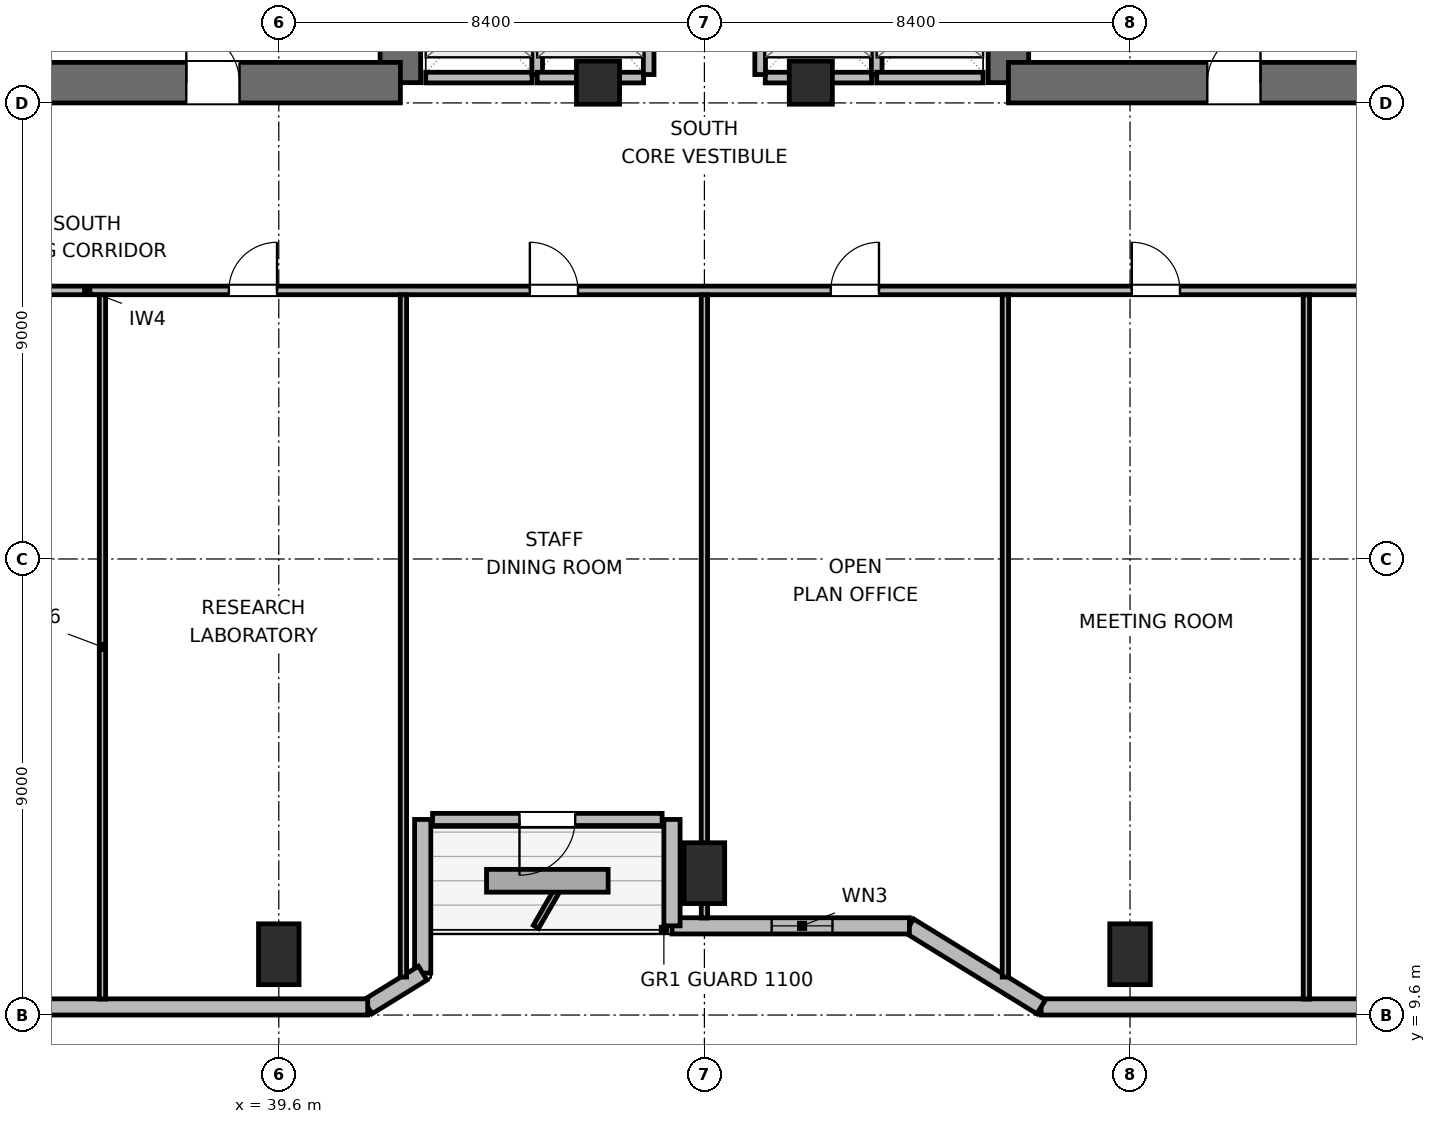
"""IFC4 building model, lengths in metres.
Left out: names, types, materials, properties, quantities, classifications, styles, units other than length and angle.
Written with IfcOpenShell. Run it as: python <this file> out.ifc"""

import sys

from ifc_helpers import new_model, si_unit, direction, frame, frame_2d, origin, origin_2d, place, context, subcontext, project, spatial, rectangle, extrude, element, fill, save


model = new_model("IFC4")
c1 = context("Model", 3, precision=1e-05, world=origin(), true_north=direction((0.0, 1.0)))
c2 = subcontext(c1, "Body", "Model", "MODEL_VIEW")
j1 = project(units=[si_unit("LENGTHUNIT", "METRE"), si_unit("PLANEANGLEUNIT", "RADIAN")], contexts=[c1])
p1 = place(None, origin())
s1 = spatial("IfcSite", under=j1, at=p1, CompositionType="ELEMENT")
p2 = place(p1, origin())
s2 = spatial("IfcBuilding", under=s1, at=p2, CompositionType="ELEMENT")
p3 = place(p2, frame((0.0, 0.0, 101.4)))
s3 = spatial("IfcBuildingStorey", under=s2, at=p3, CompositionType="ELEMENT", Elevation=101.4)
p4 = place(p3, frame((42.0, 28.0, 0.0), z_axis=(0.0, 0.0, 1.0), x_axis=(0.0, 1.0, 0.0)))
e1 = element("IfcWall", 1, at=p4, inside=s3, PredefinedType="SHEAR", context=c2, shape_type="SweptSolid", body=[
    extrude(rectangle(XDim=6.4, YDim=0.8, at=frame_2d((3.2, 0.0))), origin(), (0.0, 0.0, 1.0), 3.9),
])
p5 = place(p3, frame((32.8, 28.0, 0.0), z_axis=(0.0, 0.0, 1.0), x_axis=(1.0, 0.0, 0.0)))
e2 = element("IfcWall", 2, at=p5, inside=s3, PredefinedType="SHEAR", context=c2, shape_type="SweptSolid", body=[
    extrude(rectangle(XDim=9.2, YDim=0.8, at=frame_2d((4.6, 0.0))), origin(), (0.0, 0.0, 1.0), 3.9),
])
p6 = place(p5, frame((4.975, 0.0, 0.0)))
e3 = element("IfcOpeningElement", 3, at=p6, cuts=e2, PredefinedType="OPENING", context=c2, shape_type="SweptSolid", body=[
    extrude(rectangle(XDim=1.05, YDim=2.04, at=frame_2d((0.525, 1.02))), frame((0.0, 0.41, 0.0), z_axis=(0.0, -1.0, 0.0), x_axis=(1.0, 0.0, 0.0)), (0.0, 0.0, 1.0), 0.82),
])
p7 = place(p3, frame((54.0, 28.0, 0.0), z_axis=(0.0, 0.0, 1.0), x_axis=(0.0, 1.0, 0.0)))
e4 = element("IfcWall", 4, at=p7, inside=s3, PredefinedType="SHEAR", context=c2, shape_type="SweptSolid", body=[
    extrude(rectangle(XDim=7.8, YDim=0.8, at=frame_2d((3.9, 0.0))), origin(), (0.0, 0.0, 1.0), 3.9),
])
p8 = place(p3, frame((54.0, 28.0, 0.0), z_axis=(0.0, 0.0, 1.0), x_axis=(1.0, 0.0, 0.0)))
e5 = element("IfcWall", 5, at=p8, inside=s3, PredefinedType="SHEAR", context=c2, shape_type="SweptSolid", body=[
    extrude(rectangle(XDim=9.2, YDim=0.8, at=frame_2d((4.6, 0.0))), origin(), (0.0, 0.0, 1.0), 3.9),
])
p9 = place(p8, frame((3.925, 0.0, 0.0)))
e6 = element("IfcOpeningElement", 6, at=p9, cuts=e5, PredefinedType="OPENING", context=c2, shape_type="SweptSolid", body=[
    extrude(rectangle(XDim=1.05, YDim=2.04, at=frame_2d((0.525, 1.02))), frame((0.0, 0.41, 0.0), z_axis=(0.0, -1.0, 0.0), x_axis=(1.0, 0.0, 0.0)), (0.0, 0.0, 1.0), 0.82),
])
for number, where, z_axis, x_axis in (
    (7, (39.6, 10.8, 0.0), (0.0, 0.0, 1.0), (1.0, 0.0, 0.0)),
    (8, (48.0, 12.4, 0.0), (0.0, 0.0, 1.0), (1.0, 0.0, 0.0)),
    (9, (56.4, 10.8, 0.0), (0.0, 0.0, 1.0), (1.0, 0.0, 0.0)),
):
    element("IfcColumn", number, at=place(p3, frame(where, z_axis=z_axis, x_axis=x_axis)), inside=s3, PredefinedType="COLUMN", context=c2, shape_type="SweptSolid", body=[
        extrude(rectangle(XDim=0.8, YDim=1.2, at=origin_2d()), origin(), (0.0, 0.0, 1.0), 3.9),
    ])
for number, where, z_axis, x_axis in (
    (10, (45.9, 28.0, 0.0), (0.0, 0.0, 1.0), (1.0, 0.0, 0.0)),
    (11, (50.1, 28.0, 0.0), (0.0, 0.0, 1.0), (1.0, 0.0, 0.0)),
):
    element("IfcColumn", number, at=place(p3, frame(where, z_axis=z_axis, x_axis=x_axis)), inside=s3, PredefinedType="COLUMN", context=c2, shape_type="SweptSolid", body=[
        extrude(rectangle(XDim=0.85, YDim=0.85, at=origin_2d()), origin(), (0.0, 0.0, 1.0), 3.9),
    ])
p10 = place(p3, frame((65.379, 9.76, 0.0), z_axis=(0.0, 0.0, 1.0), x_axis=(-1.0, 0.0, 0.0)))
e12 = element("IfcWall", 12, at=p10, inside=s3, PredefinedType="SOLIDWALL", context=c2, shape_type="SweptSolid", body=[
    extrude(rectangle(XDim=10.734, YDim=0.32, at=frame_2d((5.367, 0.0))), origin(), (0.0, 0.0, 1.0), 3.64),
])
p11 = place(p10, frame((1.944, 0.0, 0.85)))
e13 = element("IfcOpeningElement", 13, at=p11, cuts=e12, PredefinedType="OPENING", context=c2, shape_type="SweptSolid", body=[
    extrude(rectangle(XDim=1.8, YDim=1.1, at=frame_2d((0.9, 0.55))), frame((0.0, 0.17, 0.0), z_axis=(0.0, -1.0, 0.0), x_axis=(1.0, 0.0, 0.0)), (0.0, 0.0, 1.0), 0.34),
])
p12 = place(p3, frame((54.645, 9.76, 0.0), z_axis=(0.0, 0.0, 1.0), x_axis=(-0.851630857047, 0.524142044989, 0.0)))
e14 = element("IfcWall", 14, at=p12, inside=s3, PredefinedType="SOLIDWALL", context=c2, shape_type="SweptSolid", body=[
    extrude(rectangle(XDim=3.053, YDim=0.32, at=frame_2d((1.526, 0.0))), origin(), (0.0, 0.0, 1.0), 2.875),
])
p13 = place(p3, frame((52.045, 11.36, 0.0), z_axis=(0.0, 0.0, 1.0), x_axis=(-1.0, 0.0, 0.0)))
e15 = element("IfcWall", 15, at=p13, inside=s3, PredefinedType="SOLIDWALL", context=c2, shape_type="SweptSolid", body=[
    extrude(rectangle(XDim=4.685, YDim=0.32, at=frame_2d((2.343, 0.0))), origin(), (0.0, 0.0, 1.0), 2.875),
])
p14 = place(p13, frame((1.518, 0.0, 0.85)))
e16 = element("IfcOpeningElement", 16, at=p14, cuts=e15, PredefinedType="OPENING", context=c2, shape_type="SweptSolid", body=[
    extrude(rectangle(XDim=1.2, YDim=1.1, at=frame_2d((0.6, 0.55))), frame((0.0, 0.17, 0.0), z_axis=(0.0, -1.0, 0.0), x_axis=(1.0, 0.0, 0.0)), (0.0, 0.0, 1.0), 0.34),
])
p15 = place(p3, frame((47.36, 11.36, 0.0), z_axis=(0.0, 0.0, 1.0), x_axis=(0.0, 1.0, 0.0)))
e17 = element("IfcWall", 17, at=p15, inside=s3, PredefinedType="SOLIDWALL", context=c2, shape_type="SweptSolid", body=[
    extrude(rectangle(XDim=2.1, YDim=0.32, at=frame_2d((1.05, 0.0))), origin(), (0.0, 0.0, 1.0), 2.875),
])
p16 = place(p3, frame((47.165, 13.46, 0.0), z_axis=(0.0, 0.0, 1.0), x_axis=(-1.0, 0.0, 0.0)))
e18 = element("IfcWall", 18, at=p16, inside=s3, PredefinedType="SOLIDWALL", context=c2, shape_type="SweptSolid", body=[
    extrude(rectangle(XDim=4.53, YDim=0.24, at=frame_2d((2.265, 0.0))), origin(), (0.0, 0.0, 1.0), 3.64),
])
p17 = place(p16, frame((1.715, 0.0, 0.0)))
e19 = element("IfcOpeningElement", 19, at=p17, cuts=e18, PredefinedType="OPENING", context=c2, shape_type="SweptSolid", body=[
    extrude(rectangle(XDim=1.1, YDim=2.04, at=frame_2d((0.55, 1.02))), frame((0.0, 0.13, 0.0), z_axis=(0.0, -1.0, 0.0), x_axis=(1.0, 0.0, 0.0)), (0.0, 0.0, 1.0), 0.26),
])
p18 = place(p3, frame((42.44, 13.46, 0.0), z_axis=(0.0, 0.0, 1.0), x_axis=(0.0, -1.0, 0.0)))
e20 = element("IfcWall", 20, at=p18, inside=s3, PredefinedType="SOLIDWALL", context=c2, shape_type="SweptSolid", body=[
    extrude(rectangle(XDim=3.032, YDim=0.32, at=frame_2d((1.516, 0.0))), origin(), (0.0, 0.0, 1.0), 2.875),
])
p19 = place(p3, frame((42.44, 10.427, 0.0), z_axis=(0.0, 0.0, 1.0), x_axis=(-0.851776724646, -0.523904964045, 0.0)))
e21 = element("IfcWall", 21, at=p19, inside=s3, PredefinedType="SOLIDWALL", context=c2, shape_type="SweptSolid", body=[
    extrude(rectangle(XDim=1.274, YDim=0.32, at=frame_2d((0.637, 0.0))), origin(), (0.0, 0.0, 1.0), 3.64),
])
p20 = place(p3, frame((41.355, 9.76, 0.0), z_axis=(0.0, 0.0, 1.0), x_axis=(-1.0, 0.0, 0.0)))
e22 = element("IfcWall", 22, at=p20, inside=s3, PredefinedType="SOLIDWALL", context=c2, shape_type="SweptSolid", body=[
    extrude(rectangle(XDim=17.934, YDim=0.32, at=frame_2d((8.967, 0.0))), origin(), (0.0, 0.0, 1.0), 3.64),
])
p21 = place(p3, frame((42.5, 28.1, 0.0), z_axis=(0.0, 0.0, 1.0), x_axis=(1.0, 0.0, 0.0)))
e23 = element("IfcWall", 23, at=p21, inside=s3, PredefinedType="PARTITIONING", context=c2, shape_type="SweptSolid", body=[
    extrude(rectangle(XDim=2.1, YDim=0.21, at=frame_2d((1.05, 0.0))), origin(), (0.0, 0.0, 1.0), 2.525),
])
p22 = place(p3, frame((44.7, 28.16, 0.0), z_axis=(0.0, 0.0, 1.0), x_axis=(0.0, 1.0, 0.0)))
e24 = element("IfcWall", 24, at=p22, inside=s3, PredefinedType="PARTITIONING", context=c2, shape_type="SweptSolid", body=[
    extrude(rectangle(XDim=2.28, YDim=0.21, at=frame_2d((1.14, 0.0))), origin(), (0.0, 0.0, 1.0), 3.64),
])
p23 = place(p3, frame((44.7, 28.1, 0.0), z_axis=(0.0, 0.0, 1.0), x_axis=(1.0, 0.0, 0.0)))
e25 = element("IfcWall", 25, at=p23, inside=s3, PredefinedType="PARTITIONING", context=c2, shape_type="SweptSolid", body=[
    extrude(rectangle(XDim=2.1, YDim=0.21, at=frame_2d((1.05, 0.0))), origin(), (0.0, 0.0, 1.0), 2.525),
])
p24 = place(p3, frame((46.9, 28.16, 0.0), z_axis=(0.0, 0.0, 1.0), x_axis=(0.0, 1.0, 0.0)))
e26 = element("IfcWall", 26, at=p24, inside=s3, PredefinedType="PARTITIONING", context=c2, shape_type="SweptSolid", body=[
    extrude(rectangle(XDim=2.28, YDim=0.21, at=frame_2d((1.14, 0.0))), origin(), (0.0, 0.0, 1.0), 3.64),
])
p25 = place(p3, frame((49.2, 28.1, 0.0), z_axis=(0.0, 0.0, 1.0), x_axis=(1.0, 0.0, 0.0)))
e27 = element("IfcWall", 27, at=p25, inside=s3, PredefinedType="PARTITIONING", context=c2, shape_type="SweptSolid", body=[
    extrude(rectangle(XDim=2.1, YDim=0.21, at=frame_2d((1.05, 0.0))), origin(), (0.0, 0.0, 1.0), 2.525),
])
for number, where, z_axis, x_axis in (
    (28, (49.1, 28.16, 0.0), (0.0, 0.0, 1.0), (0.0, 1.0, 0.0)),
    (29, (51.4, 28.16, 0.0), (0.0, 0.0, 1.0), (0.0, 1.0, 0.0)),
):
    element("IfcWall", number, at=place(p3, frame(where, z_axis=z_axis, x_axis=x_axis)), inside=s3, PredefinedType="PARTITIONING", context=c2, shape_type="SweptSolid", body=[
        extrude(rectangle(XDim=2.28, YDim=0.21, at=frame_2d((1.14, 0.0))), origin(), (0.0, 0.0, 1.0), 3.64),
    ])
p26 = place(p3, frame((51.4, 28.1, 0.0), z_axis=(0.0, 0.0, 1.0), x_axis=(1.0, 0.0, 0.0)))
e30 = element("IfcWall", 30, at=p26, inside=s3, PredefinedType="PARTITIONING", context=c2, shape_type="SweptSolid", body=[
    extrude(rectangle(XDim=2.1, YDim=0.21, at=frame_2d((1.05, 0.0))), origin(), (0.0, 0.0, 1.0), 2.525),
])
p27 = place(p3, frame((28.975, 23.9, 0.0), z_axis=(0.0, 0.0, 1.0), x_axis=(1.0, 0.0, 0.0)))
e31 = element("IfcWall", 31, at=p27, inside=s3, PredefinedType="PARTITIONING", context=c2, shape_type="SweptSolid", body=[
    extrude(rectangle(XDim=38.05, YDim=0.17, at=frame_2d((19.025, 0.0))), origin(), (0.0, 0.0, 1.0), 3.64),
])
p28 = place(p27, frame((3.097, 0.0, 0.0)))
e32 = element("IfcOpeningElement", 32, at=p28, cuts=e31, PredefinedType="OPENING", context=c2, shape_type="SweptSolid", body=[
    extrude(rectangle(XDim=0.95, YDim=2.04, at=frame_2d((0.475, 1.02))), frame((0.0, 0.095, 0.0), z_axis=(0.0, -1.0, 0.0), x_axis=(1.0, 0.0, 0.0)), (0.0, 0.0, 1.0), 0.19),
])
p29 = place(p27, frame((9.64, 0.0, 0.0)))
e33 = element("IfcOpeningElement", 33, at=p29, cuts=e31, PredefinedType="OPENING", context=c2, shape_type="SweptSolid", body=[
    extrude(rectangle(XDim=0.95, YDim=2.04, at=frame_2d((0.475, 1.02))), frame((0.0, 0.095, 0.0), z_axis=(0.0, -1.0, 0.0), x_axis=(1.0, 0.0, 0.0)), (0.0, 0.0, 1.0), 0.19),
])
p30 = place(p27, frame((15.58, 0.0, 0.0)))
e34 = element("IfcOpeningElement", 34, at=p30, cuts=e31, PredefinedType="OPENING", context=c2, shape_type="SweptSolid", body=[
    extrude(rectangle(XDim=0.95, YDim=2.04, at=frame_2d((0.475, 1.02))), frame((0.0, 0.095, 0.0), z_axis=(0.0, -1.0, 0.0), x_axis=(1.0, 0.0, 0.0)), (0.0, 0.0, 1.0), 0.19),
])
p31 = place(p27, frame((21.52, 0.0, 0.0)))
e35 = element("IfcOpeningElement", 35, at=p31, cuts=e31, PredefinedType="OPENING", context=c2, shape_type="SweptSolid", body=[
    extrude(rectangle(XDim=0.95, YDim=2.04, at=frame_2d((0.475, 1.02))), frame((0.0, 0.095, 0.0), z_axis=(0.0, -1.0, 0.0), x_axis=(1.0, 0.0, 0.0)), (0.0, 0.0, 1.0), 0.19),
])
p32 = place(p27, frame((27.46, 0.0, 0.0)))
e36 = element("IfcOpeningElement", 36, at=p32, cuts=e31, PredefinedType="OPENING", context=c2, shape_type="SweptSolid", body=[
    extrude(rectangle(XDim=0.95, YDim=2.04, at=frame_2d((0.475, 1.02))), frame((0.0, 0.095, 0.0), z_axis=(0.0, -1.0, 0.0), x_axis=(1.0, 0.0, 0.0)), (0.0, 0.0, 1.0), 0.19),
])
p33 = place(p27, frame((34.003, 0.0, 0.0)))
e37 = element("IfcOpeningElement", 37, at=p33, cuts=e31, PredefinedType="OPENING", context=c2, shape_type="SweptSolid", body=[
    extrude(rectangle(XDim=0.95, YDim=2.04, at=frame_2d((0.475, 1.02))), frame((0.0, 0.095, 0.0), z_axis=(0.0, -1.0, 0.0), x_axis=(1.0, 0.0, 0.0)), (0.0, 0.0, 1.0), 0.19),
])
p34 = place(p3, frame((36.12, 9.915, 0.0), z_axis=(0.0, 0.0, 1.0), x_axis=(0.0, 1.0, 0.0)))
e38 = element("IfcWall", 38, at=p34, inside=s3, PredefinedType="PARTITIONING", context=c2, shape_type="SweptSolid", body=[
    extrude(rectangle(XDim=13.898, YDim=0.125, at=frame_2d((6.949, 0.0))), origin(), (0.0, 0.0, 1.0), 3.64),
])
p35 = place(p3, frame((42.06, 10.349, 0.0), z_axis=(0.0, 0.0, 1.0), x_axis=(0.0, 1.0, 0.0)))
e39 = element("IfcWall", 39, at=p35, inside=s3, PredefinedType="PARTITIONING", context=c2, shape_type="SweptSolid", body=[
    extrude(rectangle(XDim=13.464, YDim=0.125, at=frame_2d((6.732, 0.0))), origin(), (0.0, 0.0, 1.0), 3.003),
])
p36 = place(p3, frame((48.0, 11.515, 0.0), z_axis=(0.0, 0.0, 1.0), x_axis=(0.0, 1.0, 0.0)))
e40 = element("IfcWall", 40, at=p36, inside=s3, PredefinedType="PARTITIONING", context=c2, shape_type="SweptSolid", body=[
    extrude(rectangle(XDim=12.298, YDim=0.125, at=frame_2d((6.149, 0.0))), origin(), (0.0, 0.0, 1.0), 3.003),
])
p37 = place(p3, frame((53.94, 10.349, 0.0), z_axis=(0.0, 0.0, 1.0), x_axis=(0.0, 1.0, 0.0)))
e41 = element("IfcWall", 41, at=p37, inside=s3, PredefinedType="PARTITIONING", context=c2, shape_type="SweptSolid", body=[
    extrude(rectangle(XDim=13.464, YDim=0.125, at=frame_2d((6.732, 0.0))), origin(), (0.0, 0.0, 1.0), 3.003),
])
p38 = place(p3, frame((59.88, 9.915, 0.0), z_axis=(0.0, 0.0, 1.0), x_axis=(0.0, 1.0, 0.0)))
e42 = element("IfcWall", 42, at=p38, inside=s3, PredefinedType="PARTITIONING", context=c2, shape_type="SweptSolid", body=[
    extrude(rectangle(XDim=13.898, YDim=0.125, at=frame_2d((6.949, 0.0))), origin(), (0.0, 0.0, 1.0), 3.64),
])
p39 = place(p14, origin())
e43 = element("IfcWindow", 43, at=p39, inside=s3, PartitioningType="SINGLE_PANEL", PredefinedType="WINDOW", context=c2, shape_type="SweptSolid", body=[
    extrude(rectangle(XDim=1.2, YDim=1.1, at=frame_2d((0.6, 0.55))), frame((0.0, 0.03, 0.0), z_axis=(0.0, -1.0, 0.0), x_axis=(1.0, 0.0, 0.0)), (0.0, 0.0, 1.0), 0.06),
])
fill(e16, e43)
p40 = place(p17, origin())
e44 = element("IfcDoor", 44, at=p40, inside=s3, OperationType="SINGLE_SWING_RIGHT", PredefinedType="DOOR", context=c2, shape_type="SweptSolid", body=[
    extrude(rectangle(XDim=1.1, YDim=2.04, at=frame_2d((0.55, 1.02))), frame((0.0, 0.025, 0.0), z_axis=(0.0, -1.0, 0.0), x_axis=(1.0, 0.0, 0.0)), (0.0, 0.0, 1.0), 0.05),
])
fill(e19, e44)
p41 = place(p6, origin())
e45 = element("IfcDoor", 45, at=p41, inside=s3, OperationType="SINGLE_SWING_LEFT", PredefinedType="DOOR", context=c2, shape_type="SweptSolid", body=[
    extrude(rectangle(XDim=1.05, YDim=2.04, at=frame_2d((0.525, 1.02))), frame((0.0, 0.025, 0.0), z_axis=(0.0, -1.0, 0.0), x_axis=(1.0, 0.0, 0.0)), (0.0, 0.0, 1.0), 0.05),
])
fill(e3, e45)
p42 = place(p9, origin())
e46 = element("IfcDoor", 46, at=p42, inside=s3, OperationType="SINGLE_SWING_RIGHT", PredefinedType="DOOR", context=c2, shape_type="SweptSolid", body=[
    extrude(rectangle(XDim=1.05, YDim=2.04, at=frame_2d((0.525, 1.02))), frame((0.0, 0.025, 0.0), z_axis=(0.0, -1.0, 0.0), x_axis=(1.0, 0.0, 0.0)), (0.0, 0.0, 1.0), 0.05),
])
fill(e6, e46)
p43 = place(p29, origin())
e47 = element("IfcDoor", 47, at=p43, inside=s3, OperationType="SINGLE_SWING_RIGHT", PredefinedType="DOOR", context=c2, shape_type="SweptSolid", body=[
    extrude(rectangle(XDim=0.95, YDim=2.04, at=frame_2d((0.475, 1.02))), frame((0.0, 0.025, 0.0), z_axis=(0.0, -1.0, 0.0), x_axis=(1.0, 0.0, 0.0)), (0.0, 0.0, 1.0), 0.05),
])
fill(e33, e47)
p44 = place(p30, origin())
e48 = element("IfcDoor", 48, at=p44, inside=s3, OperationType="SINGLE_SWING_LEFT", PredefinedType="DOOR", context=c2, shape_type="SweptSolid", body=[
    extrude(rectangle(XDim=0.95, YDim=2.04, at=frame_2d((0.475, 1.02))), frame((0.0, 0.025, 0.0), z_axis=(0.0, -1.0, 0.0), x_axis=(1.0, 0.0, 0.0)), (0.0, 0.0, 1.0), 0.05),
])
fill(e34, e48)
p45 = place(p31, origin())
e49 = element("IfcDoor", 49, at=p45, inside=s3, OperationType="SINGLE_SWING_RIGHT", PredefinedType="DOOR", context=c2, shape_type="SweptSolid", body=[
    extrude(rectangle(XDim=0.95, YDim=2.04, at=frame_2d((0.475, 1.02))), frame((0.0, 0.025, 0.0), z_axis=(0.0, -1.0, 0.0), x_axis=(1.0, 0.0, 0.0)), (0.0, 0.0, 1.0), 0.05),
])
fill(e35, e49)
p46 = place(p32, origin())
e50 = element("IfcDoor", 50, at=p46, inside=s3, OperationType="SINGLE_SWING_LEFT", PredefinedType="DOOR", context=c2, shape_type="SweptSolid", body=[
    extrude(rectangle(XDim=0.95, YDim=2.04, at=frame_2d((0.475, 1.02))), frame((0.0, 0.025, 0.0), z_axis=(0.0, -1.0, 0.0), x_axis=(1.0, 0.0, 0.0)), (0.0, 0.0, 1.0), 0.05),
])
fill(e36, e50)
save(model, sys.argv[1])
